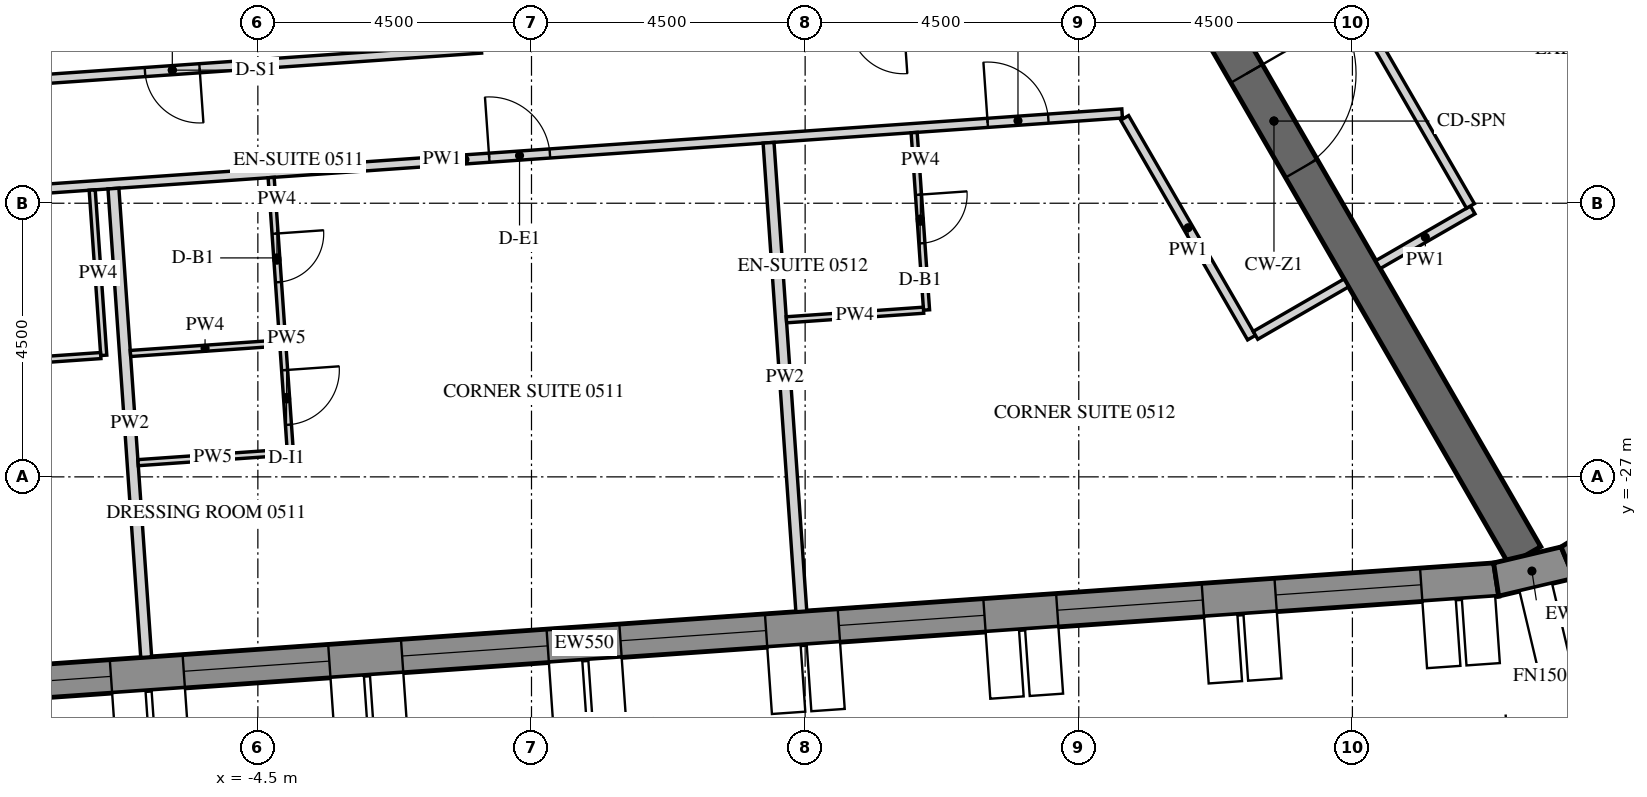
"""IFC4 building model, lengths in metres.
Left out: names, types, materials, properties, quantities, classifications, styles, units other than length and angle.
Written with IfcOpenShell. Run it as: python <this file> out.ifc"""

import sys

from ifc_helpers import new_model, si_unit, direction, frame, frame_2d, origin, place, context, subcontext, project, spatial, polyline, rectangle, outline, extrude, element, fill, save


model = new_model("IFC4")
c1 = context("Model", 3, precision=1e-05, world=origin(), true_north=direction((0.0, 1.0)))
c2 = subcontext(c1, "Body", "Model", "MODEL_VIEW")
j1 = project(units=[si_unit("LENGTHUNIT", "METRE"), si_unit("PLANEANGLEUNIT", "RADIAN")], contexts=[c1])
p1 = place(None, origin())
s1 = spatial("IfcSite", under=j1, at=p1, CompositionType="ELEMENT")
p2 = place(p1, origin())
s2 = spatial("IfcBuilding", under=s1, at=p2, CompositionType="ELEMENT")
p3 = place(p2, frame((0.0, 0.0, 80.4)))
s3 = spatial("IfcBuildingStorey", under=s2, at=p3, CompositionType="ELEMENT", Elevation=80.4)
p4 = place(p3, frame((-14.134, -30.786, -0.15), z_axis=(0.0, 0.0, 1.0), x_axis=(0.997564037441, 0.069756657061, 0.0)))
e1 = element("IfcWall", 1, at=p4, inside=s3, PredefinedType="SOLIDWALL", context=c2, shape_type="SweptSolid", body=[
    extrude(outline(polyline([(-0.026, -0.275), (30.094, -0.275), (30.049, 0.275), (0.026, 0.275), (-0.026, -0.275)])), origin(), (0.0, 0.0, 1.0), 3.9),
])
p5 = place(p4, frame((1.236, 0.0, 1.05)))
e2 = element("IfcOpeningElement", 2, at=p5, cuts=e1, PredefinedType="OPENING", context=c2, shape_type="SweptSolid", body=[
    extrude(rectangle(XDim=2.4, YDim=2.4, at=frame_2d((1.2, 1.2))), frame((0.0, 0.285, 0.0), z_axis=(0.0, -1.0, 0.0), x_axis=(1.0, 0.0, 0.0)), (0.0, 0.0, 1.0), 0.57),
])
p6 = place(p4, frame((4.835, 0.0, 1.05)))
e3 = element("IfcOpeningElement", 3, at=p6, cuts=e1, PredefinedType="OPENING", context=c2, shape_type="SweptSolid", body=[
    extrude(rectangle(XDim=2.4, YDim=2.4, at=frame_2d((1.2, 1.2))), frame((0.0, 0.285, 0.0), z_axis=(0.0, -1.0, 0.0), x_axis=(1.0, 0.0, 0.0)), (0.0, 0.0, 1.0), 0.57),
])
p7 = place(p4, frame((8.436, 0.0, 1.05)))
e4 = element("IfcOpeningElement", 4, at=p7, cuts=e1, PredefinedType="OPENING", context=c2, shape_type="SweptSolid", body=[
    extrude(rectangle(XDim=2.4, YDim=2.4, at=frame_2d((1.2, 1.2))), frame((0.0, 0.285, 0.0), z_axis=(0.0, -1.0, 0.0), x_axis=(1.0, 0.0, 0.0)), (0.0, 0.0, 1.0), 0.57),
])
p8 = place(p4, frame((12.035, 0.0, 1.05)))
e5 = element("IfcOpeningElement", 5, at=p8, cuts=e1, PredefinedType="OPENING", context=c2, shape_type="SweptSolid", body=[
    extrude(rectangle(XDim=2.4, YDim=2.4, at=frame_2d((1.2, 1.2))), frame((0.0, 0.285, 0.0), z_axis=(0.0, -1.0, 0.0), x_axis=(1.0, 0.0, 0.0)), (0.0, 0.0, 1.0), 0.57),
])
p9 = place(p4, frame((15.635, 0.0, 1.05)))
e6 = element("IfcOpeningElement", 6, at=p9, cuts=e1, PredefinedType="OPENING", context=c2, shape_type="SweptSolid", body=[
    extrude(rectangle(XDim=2.4, YDim=2.4, at=frame_2d((1.2, 1.2))), frame((0.0, 0.285, 0.0), z_axis=(0.0, -1.0, 0.0), x_axis=(1.0, 0.0, 0.0)), (0.0, 0.0, 1.0), 0.57),
])
p10 = place(p4, frame((19.236, 0.0, 1.05)))
e7 = element("IfcOpeningElement", 7, at=p10, cuts=e1, PredefinedType="OPENING", context=c2, shape_type="SweptSolid", body=[
    extrude(rectangle(XDim=2.4, YDim=2.4, at=frame_2d((1.2, 1.2))), frame((0.0, 0.285, 0.0), z_axis=(0.0, -1.0, 0.0), x_axis=(1.0, 0.0, 0.0)), (0.0, 0.0, 1.0), 0.57),
])
p11 = place(p4, frame((22.835, 0.0, 1.05)))
e8 = element("IfcOpeningElement", 8, at=p11, cuts=e1, PredefinedType="OPENING", context=c2, shape_type="SweptSolid", body=[
    extrude(rectangle(XDim=2.4, YDim=2.4, at=frame_2d((1.2, 1.2))), frame((0.0, 0.285, 0.0), z_axis=(0.0, -1.0, 0.0), x_axis=(1.0, 0.0, 0.0)), (0.0, 0.0, 1.0), 0.57),
])
p12 = place(p4, frame((26.436, 0.0, 1.05)))
e9 = element("IfcOpeningElement", 9, at=p12, cuts=e1, PredefinedType="OPENING", context=c2, shape_type="SweptSolid", body=[
    extrude(rectangle(XDim=2.4, YDim=2.4, at=frame_2d((1.2, 1.2))), frame((0.0, 0.285, 0.0), z_axis=(0.0, -1.0, 0.0), x_axis=(1.0, 0.0, 0.0)), (0.0, 0.0, 1.0), 0.57),
])
p13 = place(p3, frame((15.864, -28.688, -0.15), z_axis=(0.0, 0.0, 1.0), x_axis=(0.973063591128, 0.230536868247, 0.0)))
e10 = element("IfcWall", 10, at=p13, inside=s3, PredefinedType="SOLIDWALL", context=c2, shape_type="SweptSolid", body=[
    extrude(outline(polyline([(-0.022, -0.275), (1.253, -0.275), (1.163, 0.275), (0.022, 0.275), (-0.022, -0.275)])), origin(), (0.0, 0.0, 1.0), 3.9),
])
p14 = place(p3, frame((17.04, -28.41, -0.15), z_axis=(0.0, 0.0, 1.0), x_axis=(0.847952888306, 0.530071598195, 0.0)))
e11 = element("IfcWall", 11, at=p14, inside=s3, PredefinedType="SOLIDWALL", context=c2, shape_type="SweptSolid", body=[
    extrude(outline(polyline([(-0.045, -0.275), (1.253, -0.275), (1.163, 0.275), (0.045, 0.275), (-0.045, -0.275)])), origin(), (0.0, 0.0, 1.0), 3.9),
])
p15 = place(p3, frame((8.083, -14.0, -0.15), z_axis=(0.0, 0.0, 1.0), x_axis=(0.499997680643, -0.866026742862, 0.0)))
e12 = element("IfcWall", 12, at=p15, inside=s3, PredefinedType="SHEAR", context=c2, shape_type="SweptSolid", body=[
    extrude(rectangle(XDim=16.509, YDim=0.6, at=frame_2d((8.254, 0.0))), origin(), (0.0, 0.0, 1.0), 3.9),
])
p16 = place(p15, frame((7.354, 0.0, 0.15)))
e13 = element("IfcOpeningElement", 13, at=p16, cuts=e12, PredefinedType="OPENING", context=c2, shape_type="SweptSolid", body=[
    extrude(rectangle(XDim=1.8, YDim=2.4, at=frame_2d((0.9, 1.2))), frame((0.0, 0.31, 0.0), z_axis=(0.0, -1.0, 0.0), x_axis=(1.0, 0.0, 0.0)), (0.0, 0.0, 1.0), 0.62),
])
p17 = place(p3, frame((-11.902, -22.535, 0.0), z_axis=(0.0, 0.0, 1.0), x_axis=(0.997564081796, 0.069756022752, 0.0)))
e14 = element("IfcWall", 14, at=p17, inside=s3, PredefinedType="PARTITIONING", context=c2, shape_type="SweptSolid", body=[
    extrude(rectangle(XDim=21.668, YDim=0.15, at=frame_2d((10.834, 0.0))), origin(), (0.0, 0.0, 1.0), 2.988),
])
p18 = place(p17, frame((0.775, 0.0, 0.0)))
e15 = element("IfcOpeningElement", 15, at=p18, cuts=e14, PredefinedType="OPENING", context=c2, shape_type="SweptSolid", body=[
    extrude(rectangle(XDim=1.0, YDim=2.1, at=frame_2d((0.5, 1.05))), frame((0.0, 0.085, 0.0), z_axis=(0.0, -1.0, 0.0), x_axis=(1.0, 0.0, 0.0)), (0.0, 0.0, 1.0), 0.17),
])
p19 = place(p17, frame((11.234, 0.0, 0.0)))
e16 = element("IfcOpeningElement", 16, at=p19, cuts=e14, PredefinedType="OPENING", context=c2, shape_type="SweptSolid", body=[
    extrude(rectangle(XDim=1.0, YDim=2.1, at=frame_2d((0.5, 1.05))), frame((0.0, 0.085, 0.0), z_axis=(0.0, -1.0, 0.0), x_axis=(1.0, 0.0, 0.0)), (0.0, 0.0, 1.0), 0.17),
])
p20 = place(p17, frame((19.451, 0.0, 0.0)))
e17 = element("IfcOpeningElement", 17, at=p20, cuts=e14, PredefinedType="OPENING", context=c2, shape_type="SweptSolid", body=[
    extrude(rectangle(XDim=1.0, YDim=2.1, at=frame_2d((0.5, 1.05))), frame((0.0, 0.085, 0.0), z_axis=(0.0, -1.0, 0.0), x_axis=(1.0, 0.0, 0.0)), (0.0, 0.0, 1.0), 0.17),
])
p21 = place(p3, frame((9.755, -21.096, 0.0), z_axis=(0.0, 0.0, 1.0), x_axis=(0.499995902753, -0.866027769318, 0.0)))
e18 = element("IfcWall", 18, at=p21, inside=s3, PredefinedType="PARTITIONING", context=c2, shape_type="SweptSolid", body=[
    extrude(rectangle(XDim=4.173, YDim=0.15, at=frame_2d((2.087, 0.0))), origin(), (0.0, 0.0, 1.0), 2.988),
])
p22 = place(p3, frame((11.906, -24.673, 0.0), z_axis=(0.0, 0.0, 1.0), x_axis=(0.866013532718, 0.500020560727, 0.0)))
e19 = element("IfcWall", 19, at=p22, inside=s3, PredefinedType="PARTITIONING", context=c2, shape_type="SweptSolid", body=[
    extrude(rectangle(XDim=1.725, YDim=0.15, at=frame_2d((0.863, 0.0))), origin(), (0.0, 0.0, 1.0), 2.988),
])
p23 = place(p3, frame((-0.825, -19.956, 0.0), z_axis=(0.0, 0.0, 1.0), x_axis=(-0.997562587881, -0.069777383582, 0.0)))
e20 = element("IfcWall", 20, at=p23, inside=s3, PredefinedType="PARTITIONING", context=c2, shape_type="SweptSolid", body=[
    extrude(rectangle(XDim=10.189, YDim=0.15, at=frame_2d((5.094, 0.0))), origin(), (0.0, 0.0, 1.0), 2.988),
])
p24 = place(p23, frame((4.644, 0.0, 0.0)))
e21 = element("IfcOpeningElement", 21, at=p24, cuts=e20, PredefinedType="OPENING", context=c2, shape_type="SweptSolid", body=[
    extrude(rectangle(XDim=0.9, YDim=2.1, at=frame_2d((0.45, 1.05))), frame((0.0, 0.085, 0.0), z_axis=(0.0, -1.0, 0.0), x_axis=(1.0, 0.0, 0.0)), (0.0, 0.0, 1.0), 0.17),
])
p25 = place(p3, frame((13.92, -23.51, 0.0), z_axis=(0.0, 0.0, 1.0), x_axis=(0.866047807691, 0.499961193289, 0.0)))
e22 = element("IfcWall", 22, at=p25, inside=s3, PredefinedType="PARTITIONING", context=c2, shape_type="SweptSolid", body=[
    extrude(rectangle(XDim=1.8, YDim=0.15, at=frame_2d((0.9, 0.0))), origin(), (0.0, 0.0, 1.0), 2.988),
])
p26 = place(p3, frame((15.441, -22.545, 0.0), z_axis=(0.0, 0.0, 1.0), x_axis=(-0.500003541824, 0.866023358902, 0.0)))
e23 = element("IfcWall", 23, at=p26, inside=s3, PredefinedType="PARTITIONING", context=c2, shape_type="SweptSolid", body=[
    extrude(rectangle(XDim=3.458, YDim=0.15, at=frame_2d((1.729, 0.0))), origin(), (0.0, 0.0, 1.0), 2.988),
])
p27 = place(p3, frame((-7.224, -22.283, 0.0), z_axis=(0.0, 0.0, 1.0), x_axis=(0.069795247212, -0.997561338198, 0.0)))
e24 = element("IfcWall", 24, at=p27, inside=s3, PredefinedType="PARTITIONING", context=c2, shape_type="SweptSolid", body=[
    extrude(rectangle(XDim=2.725, YDim=0.1, at=frame_2d((1.362, 0.0))), origin(), (0.0, 0.0, 1.0), 2.988),
])
p28 = place(p3, frame((-7.084, -25.005, 0.0), z_axis=(0.0, 0.0, 1.0), x_axis=(-0.997567715103, -0.06970404424, 0.0)))
e25 = element("IfcWall", 25, at=p28, inside=s3, PredefinedType="PARTITIONING", context=c2, shape_type="SweptSolid", body=[
    extrude(rectangle(XDim=2.35, YDim=0.1, at=frame_2d((1.175, 0.0))), origin(), (0.0, 0.0, 1.0), 2.988),
])
p29 = place(p3, frame((-6.336, -29.965, 0.0), z_axis=(0.0, 0.0, 1.0), x_axis=(-0.069780381152, 0.997562378203, 0.0)))
e26 = element("IfcWall", 26, at=p29, inside=s3, PredefinedType="PARTITIONING", context=c2, shape_type="SweptSolid", body=[
    extrude(rectangle(XDim=7.725, YDim=0.18, at=frame_2d((3.863, 0.0))), origin(), (0.0, 0.0, 1.0), 2.988),
])
p30 = place(p3, frame((-4.281, -22.077, 0.0), z_axis=(0.0, 0.0, 1.0), x_axis=(0.069789009646, -0.997561774595, 0.0)))
e27 = element("IfcWall", 27, at=p30, inside=s3, PredefinedType="PARTITIONING", context=c2, shape_type="SweptSolid", body=[
    extrude(rectangle(XDim=2.725, YDim=0.1, at=frame_2d((1.363, 0.0))), origin(), (0.0, 0.0, 1.0), 2.988),
])
p31 = place(p30, frame((0.925, 0.0, 0.0)))
e28 = element("IfcOpeningElement", 28, at=p31, cuts=e27, PredefinedType="OPENING", context=c2, shape_type="SweptSolid", body=[
    extrude(rectangle(XDim=0.8, YDim=2.1, at=frame_2d((0.4, 1.05))), frame((0.0, 0.06, 0.0), z_axis=(0.0, -1.0, 0.0), x_axis=(1.0, 0.0, 0.0)), (0.0, 0.0, 1.0), 0.12),
])
p32 = place(p3, frame((-4.088, -24.846, 0.0), z_axis=(0.0, 0.0, 1.0), x_axis=(0.069759707979, -0.997563824095, 0.0)))
e29 = element("IfcWall", 29, at=p32, inside=s3, PredefinedType="PARTITIONING", context=c2, shape_type="SweptSolid", body=[
    extrude(rectangle(XDim=1.75, YDim=0.1, at=frame_2d((0.875, 0.0))), origin(), (0.0, 0.0, 1.0), 2.988),
])
p33 = place(p32, frame((0.4, 0.0, 0.0)))
e30 = element("IfcOpeningElement", 30, at=p33, cuts=e29, PredefinedType="OPENING", context=c2, shape_type="SweptSolid", body=[
    extrude(rectangle(XDim=0.9, YDim=2.1, at=frame_2d((0.45, 1.05))), frame((0.0, 0.06, 0.0), z_axis=(0.0, -1.0, 0.0), x_axis=(1.0, 0.0, 0.0)), (0.0, 0.0, 1.0), 0.12),
])
p34 = place(p3, frame((-4.016, -26.595, 0.0), z_axis=(0.0, 0.0, 1.0), x_axis=(-0.997563389425, -0.069765923475, 0.0)))
e31 = element("IfcWall", 31, at=p34, inside=s3, PredefinedType="PARTITIONING", context=c2, shape_type="SweptSolid", body=[
    extrude(rectangle(XDim=2.46, YDim=0.1, at=frame_2d((1.23, 0.0))), origin(), (0.0, 0.0, 1.0), 2.988),
])
p35 = place(p3, frame((4.438, -29.212, 0.0), z_axis=(0.0, 0.0, 1.0), x_axis=(-0.069780381152, 0.997562378203, 0.0)))
e32 = element("IfcWall", 32, at=p35, inside=s3, PredefinedType="PARTITIONING", context=c2, shape_type="SweptSolid", body=[
    extrude(rectangle(XDim=7.725, YDim=0.18, at=frame_2d((3.863, 0.0))), origin(), (0.0, 0.0, 1.0), 2.988),
])
p36 = place(p3, frame((-6.595, -24.971, 0.0), z_axis=(0.0, 0.0, 1.0), x_axis=(0.997562906323, 0.069772830877, 0.0)))
e33 = element("IfcWall", 33, at=p36, inside=s3, PredefinedType="PARTITIONING", context=c2, shape_type="SweptSolid", body=[
    extrude(rectangle(XDim=2.46, YDim=0.1, at=frame_2d((1.23, 0.0))), origin(), (0.0, 0.0, 1.0), 2.988),
])
p37 = place(p3, frame((6.293, -21.338, 0.0), z_axis=(0.0, 0.0, 1.0), x_axis=(0.069781781132, -0.997562280272, 0.0)))
e34 = element("IfcWall", 34, at=p37, inside=s3, PredefinedType="PARTITIONING", context=c2, shape_type="SweptSolid", body=[
    extrude(rectangle(XDim=2.925, YDim=0.1, at=frame_2d((1.462, 0.0))), origin(), (0.0, 0.0, 1.0), 2.988),
])
p38 = place(p37, frame((1.025, 0.0, 0.0)))
e35 = element("IfcOpeningElement", 35, at=p38, cuts=e34, PredefinedType="OPENING", context=c2, shape_type="SweptSolid", body=[
    extrude(rectangle(XDim=0.8, YDim=2.1, at=frame_2d((0.4, 1.05))), frame((0.0, 0.06, 0.0), z_axis=(0.0, -1.0, 0.0), x_axis=(1.0, 0.0, 0.0)), (0.0, 0.0, 1.0), 0.12),
])
p39 = place(p3, frame((6.447, -24.259, 0.0), z_axis=(0.0, 0.0, 1.0), x_axis=(-0.997561825928, -0.069788275888, 0.0)))
e36 = element("IfcWall", 36, at=p39, inside=s3, PredefinedType="PARTITIONING", context=c2, shape_type="SweptSolid", body=[
    extrude(rectangle(XDim=2.26, YDim=0.1, at=frame_2d((1.13, 0.0))), origin(), (0.0, 0.0, 1.0), 2.988),
])
p40 = place(p3, frame((-5.719, -14.0, 0.0), z_axis=(0.0, 0.0, 1.0), x_axis=(-0.378193217714, -0.925726682166, 0.0)))
e37 = element("IfcWall", 37, at=p40, inside=s3, PredefinedType="PARTITIONING", context=c2, shape_type="SweptSolid", body=[
    extrude(rectangle(XDim=6.92, YDim=0.12, at=frame_2d((3.46, 0.0))), origin(), (0.0, 0.0, 1.0), 2.988),
])
p41 = place(p6, frame((0.0, 0.205, 0.0)))
e38 = element("IfcWindow", 38, at=p41, inside=s3, PartitioningType="DOUBLE_PANEL_VERTICAL", PredefinedType="WINDOW", context=c2, shape_type="SweptSolid", body=[
    extrude(rectangle(XDim=2.4, YDim=2.4, at=frame_2d((1.2, 1.2))), frame((0.0, 0.03, 0.0), z_axis=(0.0, -1.0, 0.0), x_axis=(1.0, 0.0, 0.0)), (0.0, 0.0, 1.0), 0.06),
])
fill(e3, e38)
p42 = place(p7, frame((0.0, 0.205, 0.0)))
e39 = element("IfcWindow", 39, at=p42, inside=s3, PartitioningType="DOUBLE_PANEL_VERTICAL", PredefinedType="WINDOW", context=c2, shape_type="SweptSolid", body=[
    extrude(rectangle(XDim=2.4, YDim=2.4, at=frame_2d((1.2, 1.2))), frame((0.0, 0.03, 0.0), z_axis=(0.0, -1.0, 0.0), x_axis=(1.0, 0.0, 0.0)), (0.0, 0.0, 1.0), 0.06),
])
fill(e4, e39)
p43 = place(p8, frame((0.0, 0.205, 0.0)))
e40 = element("IfcWindow", 40, at=p43, inside=s3, PartitioningType="DOUBLE_PANEL_VERTICAL", PredefinedType="WINDOW", context=c2, shape_type="SweptSolid", body=[
    extrude(rectangle(XDim=2.4, YDim=2.4, at=frame_2d((1.2, 1.2))), frame((0.0, 0.03, 0.0), z_axis=(0.0, -1.0, 0.0), x_axis=(1.0, 0.0, 0.0)), (0.0, 0.0, 1.0), 0.06),
])
fill(e5, e40)
p44 = place(p9, frame((0.0, 0.205, 0.0)))
e41 = element("IfcWindow", 41, at=p44, inside=s3, PartitioningType="DOUBLE_PANEL_VERTICAL", PredefinedType="WINDOW", context=c2, shape_type="SweptSolid", body=[
    extrude(rectangle(XDim=2.4, YDim=2.4, at=frame_2d((1.2, 1.2))), frame((0.0, 0.03, 0.0), z_axis=(0.0, -1.0, 0.0), x_axis=(1.0, 0.0, 0.0)), (0.0, 0.0, 1.0), 0.06),
])
fill(e6, e41)
p45 = place(p10, frame((0.0, 0.205, 0.0)))
e42 = element("IfcWindow", 42, at=p45, inside=s3, PartitioningType="DOUBLE_PANEL_VERTICAL", PredefinedType="WINDOW", context=c2, shape_type="SweptSolid", body=[
    extrude(rectangle(XDim=2.4, YDim=2.4, at=frame_2d((1.2, 1.2))), frame((0.0, 0.03, 0.0), z_axis=(0.0, -1.0, 0.0), x_axis=(1.0, 0.0, 0.0)), (0.0, 0.0, 1.0), 0.06),
])
fill(e7, e42)
p46 = place(p11, frame((0.0, 0.205, 0.0)))
e43 = element("IfcWindow", 43, at=p46, inside=s3, PartitioningType="DOUBLE_PANEL_VERTICAL", PredefinedType="WINDOW", context=c2, shape_type="SweptSolid", body=[
    extrude(rectangle(XDim=2.4, YDim=2.4, at=frame_2d((1.2, 1.2))), frame((0.0, 0.03, 0.0), z_axis=(0.0, -1.0, 0.0), x_axis=(1.0, 0.0, 0.0)), (0.0, 0.0, 1.0), 0.06),
])
fill(e8, e43)
p47 = place(p12, frame((0.0, 0.205, 0.0)))
e44 = element("IfcWindow", 44, at=p47, inside=s3, PartitioningType="DOUBLE_PANEL_VERTICAL", PredefinedType="WINDOW", context=c2, shape_type="SweptSolid", body=[
    extrude(rectangle(XDim=2.4, YDim=2.4, at=frame_2d((1.2, 1.2))), frame((0.0, 0.03, 0.0), z_axis=(0.0, -1.0, 0.0), x_axis=(1.0, 0.0, 0.0)), (0.0, 0.0, 1.0), 0.06),
])
fill(e9, e44)
p48 = place(p16, origin())
e45 = element("IfcDoor", 45, at=p48, inside=s3, OperationType="DOUBLE_DOOR_SINGLE_SWING", PredefinedType="DOOR", context=c2, shape_type="SweptSolid", body=[
    extrude(rectangle(XDim=1.8, YDim=2.4, at=frame_2d((0.9, 1.2))), frame((0.0, 0.025, 0.0), z_axis=(0.0, -1.0, 0.0), x_axis=(1.0, 0.0, 0.0)), (0.0, 0.0, 1.0), 0.05),
])
fill(e13, e45)
p49 = place(p19, origin())
e46 = element("IfcDoor", 46, at=p49, inside=s3, OperationType="SINGLE_SWING_LEFT", PredefinedType="DOOR", context=c2, shape_type="SweptSolid", body=[
    extrude(rectangle(XDim=1.0, YDim=2.1, at=frame_2d((0.5, 1.05))), frame((0.0, 0.025, 0.0), z_axis=(0.0, -1.0, 0.0), x_axis=(1.0, 0.0, 0.0)), (0.0, 0.0, 1.0), 0.05),
])
fill(e16, e46)
p50 = place(p31, origin())
e47 = element("IfcDoor", 47, at=p50, inside=s3, OperationType="SINGLE_SWING_RIGHT", PredefinedType="DOOR", context=c2, shape_type="SweptSolid", body=[
    extrude(rectangle(XDim=0.8, YDim=2.1, at=frame_2d((0.4, 1.05))), frame((0.0, 0.025, 0.0), z_axis=(0.0, -1.0, 0.0), x_axis=(1.0, 0.0, 0.0)), (0.0, 0.0, 1.0), 0.05),
])
fill(e28, e47)
p51 = place(p33, origin())
e48 = element("IfcDoor", 48, at=p51, inside=s3, OperationType="SINGLE_SWING_LEFT", PredefinedType="DOOR", context=c2, shape_type="SweptSolid", body=[
    extrude(rectangle(XDim=0.9, YDim=2.1, at=frame_2d((0.45, 1.05))), frame((0.0, 0.025, 0.0), z_axis=(0.0, -1.0, 0.0), x_axis=(1.0, 0.0, 0.0)), (0.0, 0.0, 1.0), 0.05),
])
fill(e30, e48)
p52 = place(p20, origin())
e49 = element("IfcDoor", 49, at=p52, inside=s3, OperationType="SINGLE_SWING_LEFT", PredefinedType="DOOR", context=c2, shape_type="SweptSolid", body=[
    extrude(rectangle(XDim=1.0, YDim=2.1, at=frame_2d((0.5, 1.05))), frame((0.0, 0.025, 0.0), z_axis=(0.0, -1.0, 0.0), x_axis=(1.0, 0.0, 0.0)), (0.0, 0.0, 1.0), 0.05),
])
fill(e17, e49)
p53 = place(p38, origin())
e50 = element("IfcDoor", 50, at=p53, inside=s3, OperationType="SINGLE_SWING_RIGHT", PredefinedType="DOOR", context=c2, shape_type="SweptSolid", body=[
    extrude(rectangle(XDim=0.8, YDim=2.1, at=frame_2d((0.4, 1.05))), frame((0.0, 0.025, 0.0), z_axis=(0.0, -1.0, 0.0), x_axis=(1.0, 0.0, 0.0)), (0.0, 0.0, 1.0), 0.05),
])
fill(e35, e50)
p54 = place(p24, origin())
e51 = element("IfcDoor", 51, at=p54, inside=s3, OperationType="SINGLE_SWING_LEFT", PredefinedType="DOOR", context=c2, shape_type="SweptSolid", body=[
    extrude(rectangle(XDim=0.9, YDim=2.1, at=frame_2d((0.45, 1.05))), frame((0.0, 0.025, 0.0), z_axis=(0.0, -1.0, 0.0), x_axis=(1.0, 0.0, 0.0)), (0.0, 0.0, 1.0), 0.05),
])
fill(e21, e51)
save(model, sys.argv[1])
